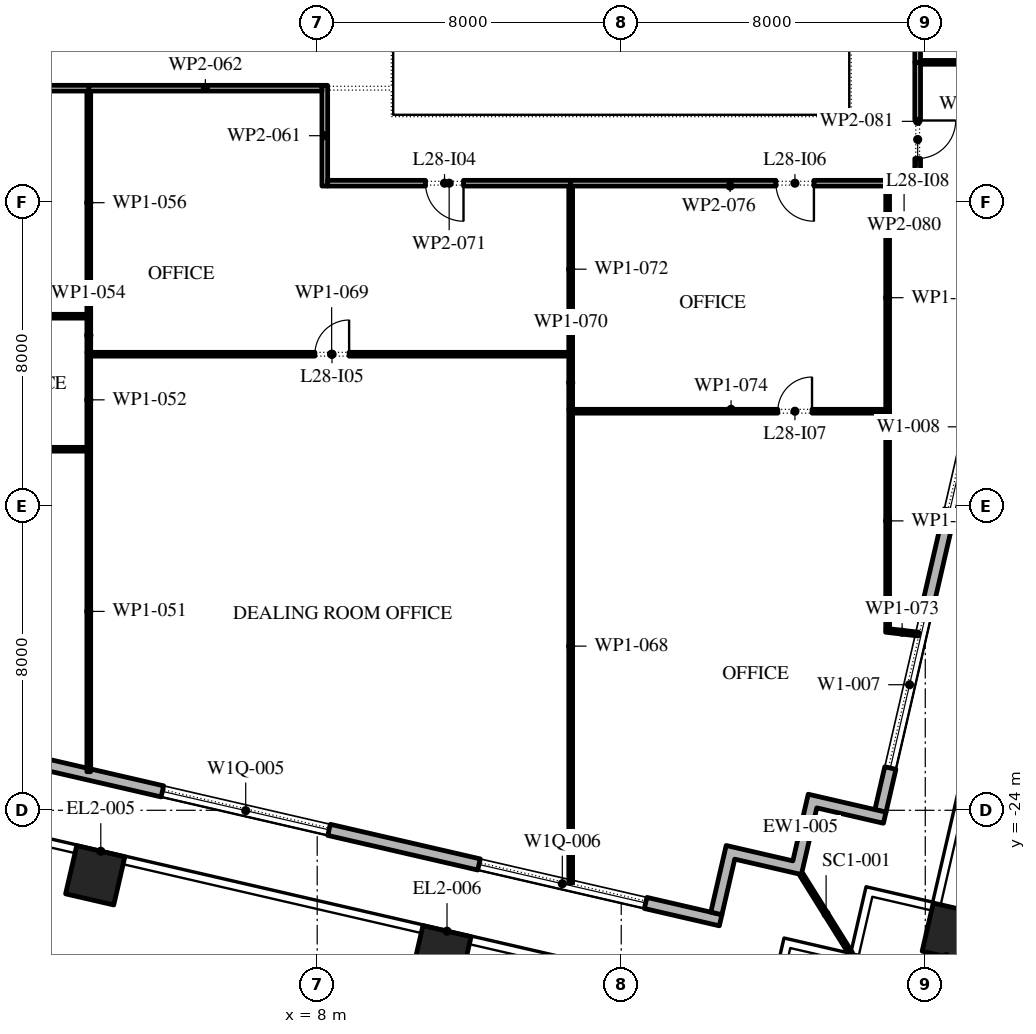
"""IFC4 building model, lengths in metres.
Left out: names, types, materials, properties, quantities, classifications, styles, units other than length and angle.
Written with IfcOpenShell. Run it as: python <this file> out.ifc"""

import sys

from ifc_helpers import new_model, si_unit, direction, frame, frame_2d, origin, origin_2d, place, context, subcontext, project, spatial, polyline, rectangle, outline, extrude, element, fill, save


model = new_model("IFC4")
c1 = context("Model", 3, precision=1e-05, world=origin(), true_north=direction((0.0, 1.0)))
c2 = subcontext(c1, "Body", "Model", "MODEL_VIEW")
j1 = project(units=[si_unit("LENGTHUNIT", "METRE"), si_unit("PLANEANGLEUNIT", "RADIAN")], contexts=[c1])
p1 = place(None, origin())
s1 = spatial("IfcSite", under=j1, at=p1, CompositionType="ELEMENT")
p2 = place(p1, origin())
s2 = spatial("IfcBuilding", under=s1, at=p2, CompositionType="ELEMENT")
p3 = place(p2, frame((0.0, 0.0, 130.8)))
s3 = spatial("IfcBuildingStorey", under=s2, at=p3, CompositionType="ELEMENT", Elevation=130.8)
for number, where, z_axis, x_axis in (
    (1, (2.159, -25.711, 0.0), (0.0, 0.0, 1.0), (0.974, -0.225, 0.0)),
    (2, (11.27, -27.815, 0.0), (0.0, 0.0, 1.0), (0.974, -0.225, 0.0)),
    (3, (24.698, -27.22, 0.0), (0.0, 0.0, 1.0), (0.974, -0.225, 0.0)),
    (4, (22.539, -28.569, 0.0), (0.0, 0.0, 1.0), (0.974, -0.225, 0.0)),
):
    element("IfcColumn", number, at=place(p3, frame(where, z_axis=z_axis, x_axis=x_axis)), inside=s3, PredefinedType="COLUMN", context=c2, shape_type="SweptSolid", body=[
        extrude(rectangle(XDim=1.3, YDim=1.3, at=origin_2d()), origin(), (0.0, 0.0, 1.0), 4.2),
    ])
p4 = place(p3, frame((-31.078, -15.421, 0.0), z_axis=(0.0, 0.0, 1.0), x_axis=(0.974370456532, -0.224949357493, 0.0)))
e5 = element("IfcWall", 5, at=p4, inside=s3, PredefinedType="STANDARD", context=c2, shape_type="SweptSolid", body=[
    extrude(rectangle(XDim=51.0, YDim=0.3, at=frame_2d((25.5, 0.0))), origin(), (0.0, 0.0, 1.0), 4.0),
])
p5 = place(p4, frame((1.875, 0.0, 0.45)))
e6 = element("IfcOpeningElement", 6, at=p5, cuts=e5, PredefinedType="OPENING", context=c2, shape_type="SweptSolid", body=[
    extrude(rectangle(XDim=4.5, YDim=2.65, at=frame_2d((2.25, 1.325))), frame((0.0, 0.16, 0.0), z_axis=(0.0, -1.0, 0.0), x_axis=(1.0, 0.0, 0.0)), (0.0, 0.0, 1.0), 0.32),
])
p6 = place(p4, frame((10.275, 0.0, 0.45)))
e7 = element("IfcOpeningElement", 7, at=p6, cuts=e5, PredefinedType="OPENING", context=c2, shape_type="SweptSolid", body=[
    extrude(rectangle(XDim=4.5, YDim=2.525, at=frame_2d((2.25, 1.262))), frame((0.0, 0.16, 0.0), z_axis=(0.0, -1.0, 0.0), x_axis=(1.0, 0.0, 0.0)), (0.0, 0.0, 1.0), 0.32),
])
p7 = place(p4, frame((18.825, 0.0, 0.45)))
e8 = element("IfcOpeningElement", 8, at=p7, cuts=e5, PredefinedType="OPENING", context=c2, shape_type="SweptSolid", body=[
    extrude(rectangle(XDim=4.5, YDim=2.5, at=frame_2d((2.25, 1.25))), frame((0.0, 0.16, 0.0), z_axis=(0.0, -1.0, 0.0), x_axis=(1.0, 0.0, 0.0)), (0.0, 0.0, 1.0), 0.32),
])
p8 = place(p4, frame((28.425, 0.0, 0.0)))
e9 = element("IfcOpeningElement", 9, at=p8, cuts=e5, PredefinedType="OPENING", context=c2, shape_type="SweptSolid", body=[
    extrude(rectangle(XDim=2.4, YDim=2.9, at=frame_2d((1.2, 1.45))), frame((0.0, 0.16, 0.0), z_axis=(0.0, -1.0, 0.0), x_axis=(1.0, 0.0, 0.0)), (0.0, 0.0, 1.0), 0.32),
])
p9 = place(p4, frame((35.925, 0.0, 0.45)))
e10 = element("IfcOpeningElement", 10, at=p9, cuts=e5, PredefinedType="OPENING", context=c2, shape_type="SweptSolid", body=[
    extrude(rectangle(XDim=4.5, YDim=2.45, at=frame_2d((2.25, 1.225))), frame((0.0, 0.16, 0.0), z_axis=(0.0, -1.0, 0.0), x_axis=(1.0, 0.0, 0.0)), (0.0, 0.0, 1.0), 0.32),
])
p10 = place(p4, frame((44.475, 0.0, 0.45)))
e11 = element("IfcOpeningElement", 11, at=p10, cuts=e5, PredefinedType="OPENING", context=c2, shape_type="SweptSolid", body=[
    extrude(rectangle(XDim=4.5, YDim=2.45, at=frame_2d((2.25, 1.225))), frame((0.0, 0.16, 0.0), z_axis=(0.0, -1.0, 0.0), x_axis=(1.0, 0.0, 0.0)), (0.0, 0.0, 1.0), 0.32),
])
p11 = place(p3, frame((22.82, -24.016, 0.0), z_axis=(0.0, 0.0, 1.0), x_axis=(0.224953880882, 0.974369412223, 0.0)))
e12 = element("IfcWall", 12, at=p11, inside=s3, PredefinedType="STANDARD", context=c2, shape_type="SweptSolid", body=[
    extrude(rectangle(XDim=49.5, YDim=0.3, at=frame_2d((24.75, 0.0))), origin(), (0.0, 0.0, 1.0), 4.0),
])
p12 = place(p11, frame((1.157, 0.0, 0.45)))
e13 = element("IfcOpeningElement", 13, at=p12, cuts=e12, PredefinedType="OPENING", context=c2, shape_type="SweptSolid", body=[
    extrude(rectangle(XDim=4.5, YDim=3.05, at=frame_2d((2.25, 1.525))), frame((0.0, 0.16, 0.0), z_axis=(0.0, -1.0, 0.0), x_axis=(1.0, 0.0, 0.0)), (0.0, 0.0, 1.0), 0.32),
])
p13 = place(p11, frame((8.121, 0.0, 0.45)))
e14 = element("IfcOpeningElement", 14, at=p13, cuts=e12, PredefinedType="OPENING", context=c2, shape_type="SweptSolid", body=[
    extrude(rectangle(XDim=4.5, YDim=3.05, at=frame_2d((2.25, 1.525))), frame((0.0, 0.16, 0.0), z_axis=(0.0, -1.0, 0.0), x_axis=(1.0, 0.0, 0.0)), (0.0, 0.0, 1.0), 0.32),
])
p14 = place(p11, frame((15.236, 0.0, 0.45)))
e15 = element("IfcOpeningElement", 15, at=p14, cuts=e12, PredefinedType="OPENING", context=c2, shape_type="SweptSolid", body=[
    extrude(rectangle(XDim=4.5, YDim=3.05, at=frame_2d((2.25, 1.525))), frame((0.0, 0.16, 0.0), z_axis=(0.0, -1.0, 0.0), x_axis=(1.0, 0.0, 0.0)), (0.0, 0.0, 1.0), 0.32),
])
p15 = place(p11, frame((23.4, 0.0, 0.0)))
e16 = element("IfcOpeningElement", 16, at=p15, cuts=e12, PredefinedType="OPENING", context=c2, shape_type="SweptSolid", body=[
    extrude(rectangle(XDim=2.4, YDim=3.5, at=frame_2d((1.2, 1.75))), frame((0.0, 0.16, 0.0), z_axis=(0.0, -1.0, 0.0), x_axis=(1.0, 0.0, 0.0)), (0.0, 0.0, 1.0), 0.32),
])
p16 = place(p11, frame((29.464, 0.0, 0.45)))
e17 = element("IfcOpeningElement", 17, at=p16, cuts=e12, PredefinedType="OPENING", context=c2, shape_type="SweptSolid", body=[
    extrude(rectangle(XDim=4.5, YDim=2.875, at=frame_2d((2.25, 1.438))), frame((0.0, 0.16, 0.0), z_axis=(0.0, -1.0, 0.0), x_axis=(1.0, 0.0, 0.0)), (0.0, 0.0, 1.0), 0.32),
])
p17 = place(p11, frame((36.579, 0.0, 0.45)))
e18 = element("IfcOpeningElement", 18, at=p17, cuts=e12, PredefinedType="OPENING", context=c2, shape_type="SweptSolid", body=[
    extrude(rectangle(XDim=4.5, YDim=2.825, at=frame_2d((2.25, 1.413))), frame((0.0, 0.16, 0.0), z_axis=(0.0, -1.0, 0.0), x_axis=(1.0, 0.0, 0.0)), (0.0, 0.0, 1.0), 0.32),
])
p18 = place(p11, frame((43.693, 0.0, 0.45)))
e19 = element("IfcOpeningElement", 19, at=p18, cuts=e12, PredefinedType="OPENING", context=c2, shape_type="SweptSolid", body=[
    extrude(rectangle(XDim=4.5, YDim=2.75, at=frame_2d((2.25, 1.375))), frame((0.0, 0.16, 0.0), z_axis=(0.0, -1.0, 0.0), x_axis=(1.0, 0.0, 0.0)), (0.0, 0.0, 1.0), 0.32),
])
p19 = place(p3, origin())
e20 = element("IfcWall", 20, at=p19, inside=s3, PredefinedType="STANDARD", context=c2, shape_type="SweptSolid", body=[
    extrude(outline(polyline([(20.515, -25.331), (20.92, -23.577), (22.967, -24.049), (22.899, -24.342), (21.145, -23.937), (20.74, -25.691), (18.986, -25.286), (18.649, -26.747), (18.357, -26.68), (18.762, -24.926), (20.515, -25.331)])), origin(), (0.0, 0.0, 1.0), 4.0),
])
p20 = place(p3, frame((20.74, -25.691, -0.05), z_axis=(0.0, 0.0, 1.0), x_axis=(0.529972121605, -0.848015064914, 0.0)))
e21 = element("IfcWall", 21, at=p20, inside=s3, PredefinedType="STANDARD", context=c2, shape_type="SweptSolid", body=[
    extrude(rectangle(XDim=2.455, YDim=0.1, at=frame_2d((1.228, 0.0))), origin(), (0.0, 0.0, 1.0), 4.05),
])
p21 = place(p3, frame((2.04, -14.5, 0.0), z_axis=(0.0, 0.0, 1.0), x_axis=(-1.0, 0.0, 0.0)))
e22 = element("IfcWall", 22, at=p21, inside=s3, PredefinedType="PARTITIONING", context=c2, shape_type="SweptSolid", body=[
    extrude(rectangle(XDim=8.33, YDim=0.1, at=frame_2d((4.165, 0.0))), origin(), (0.0, 0.0, 1.0), 4.0),
])
p22 = place(p3, frame((1.99, -14.55, 0.0), z_axis=(0.0, 0.0, 1.0), x_axis=(0.0, -1.0, 0.0)))
e23 = element("IfcWall", 23, at=p22, inside=s3, PredefinedType="PARTITIONING", context=c2, shape_type="SweptSolid", body=[
    extrude(rectangle(XDim=8.434, YDim=0.1, at=frame_2d((4.217, 0.0))), origin(), (0.0, 0.0, 1.0), 4.0),
])
p23 = place(p3, frame((1.99, -11.95, 0.0), z_axis=(0.0, 0.0, 1.0), x_axis=(0.0, -1.0, 0.0)))
e24 = element("IfcWall", 24, at=p23, inside=s3, PredefinedType="PARTITIONING", context=c2, shape_type="SweptSolid", body=[
    extrude(rectangle(XDim=2.5, YDim=0.1, at=frame_2d((1.25, 0.0))), origin(), (0.0, 0.0, 1.0), 4.0),
])
p24 = place(p3, frame((2.04, -11.0, 0.0), z_axis=(0.0, 0.0, 1.0), x_axis=(-1.0, 0.0, 0.0)))
e25 = element("IfcWall", 25, at=p24, inside=s3, PredefinedType="PARTITIONING", context=c2, shape_type="SweptSolid", body=[
    extrude(rectangle(XDim=8.33, YDim=0.1, at=frame_2d((4.165, 0.0))), origin(), (0.0, 0.0, 1.0), 4.0),
])
p25 = place(p24, frame((5.53, 0.0, 0.0)))
e26 = element("IfcOpeningElement", 26, at=p25, cuts=e25, PredefinedType="OPENING", context=c2, shape_type="SweptSolid", body=[
    extrude(rectangle(XDim=0.9, YDim=2.1, at=frame_2d((0.45, 1.05))), frame((0.0, 0.06, 0.0), z_axis=(0.0, -1.0, 0.0), x_axis=(1.0, 0.0, 0.0)), (0.0, 0.0, 1.0), 0.12),
])
p26 = place(p3, frame((1.99, -11.05, 0.0), z_axis=(0.0, 0.0, 1.0), x_axis=(0.0, -1.0, 0.0)))
e27 = element("IfcWall", 27, at=p26, inside=s3, PredefinedType="PARTITIONING", context=c2, shape_type="SweptSolid", body=[
    extrude(rectangle(XDim=0.9, YDim=0.1, at=frame_2d((0.45, 0.0))), origin(), (0.0, 0.0, 1.0), 4.0),
])
p27 = place(p3, frame((2.04, -5.0, 0.0), z_axis=(0.0, 0.0, 1.0), x_axis=(-1.0, 0.0, 0.0)))
e28 = element("IfcWall", 28, at=p27, inside=s3, PredefinedType="PARTITIONING", context=c2, shape_type="SweptSolid", body=[
    extrude(rectangle(XDim=8.305, YDim=0.15, at=frame_2d((4.152, 0.0))), origin(), (0.0, 0.0, 1.0), 4.0),
])
p28 = place(p27, frame((1.98, 0.0, 0.0)))
e29 = element("IfcOpeningElement", 29, at=p28, cuts=e28, PredefinedType="OPENING", context=c2, shape_type="SweptSolid", body=[
    extrude(rectangle(XDim=1.0, YDim=2.1, at=frame_2d((0.5, 1.05))), frame((0.0, 0.085, 0.0), z_axis=(0.0, -1.0, 0.0), x_axis=(1.0, 0.0, 0.0)), (0.0, 0.0, 1.0), 0.17),
])
p29 = place(p3, frame((1.99, -5.075, 0.0), z_axis=(0.0, 0.0, 1.0), x_axis=(0.0, -1.0, 0.0)))
e30 = element("IfcWall", 30, at=p29, inside=s3, PredefinedType="PARTITIONING", context=c2, shape_type="SweptSolid", body=[
    extrude(rectangle(XDim=5.875, YDim=0.1, at=frame_2d((2.938, 0.0))), origin(), (0.0, 0.0, 1.0), 4.0),
])
p30 = place(p3, frame((8.2, -7.575, 0.0), z_axis=(0.0, 0.0, 1.0), x_axis=(0.0, 1.0, 0.0)))
e31 = element("IfcWall", 31, at=p30, inside=s3, PredefinedType="PARTITIONING", context=c2, shape_type="SweptSolid", body=[
    extrude(rectangle(XDim=2.65, YDim=0.15, at=frame_2d((1.325, 0.0))), origin(), (0.0, 0.0, 1.0), 4.0),
])
p31 = place(p3, frame((8.125, -5.0, 0.0), z_axis=(0.0, 0.0, 1.0), x_axis=(-1.0, 0.0, 0.0)))
e32 = element("IfcWall", 32, at=p31, inside=s3, PredefinedType="PARTITIONING", context=c2, shape_type="SweptSolid", body=[
    extrude(rectangle(XDim=6.135, YDim=0.15, at=frame_2d((3.067, 0.0))), origin(), (0.0, 0.0, 1.0), 4.0),
])
p32 = place(p3, frame((14.67, -13.45, 0.0), z_axis=(0.0, 0.0, 1.0), x_axis=(0.0, -1.0, 0.0)))
e33 = element("IfcWall", 33, at=p32, inside=s3, PredefinedType="PARTITIONING", context=c2, shape_type="SweptSolid", body=[
    extrude(rectangle(XDim=12.461, YDim=0.1, at=frame_2d((6.23, 0.0))), origin(), (0.0, 0.0, 1.0), 4.0),
])
p33 = place(p3, frame((14.72, -12.0, 0.0), z_axis=(0.0, 0.0, 1.0), x_axis=(-1.0, 0.0, 0.0)))
e34 = element("IfcWall", 34, at=p33, inside=s3, PredefinedType="PARTITIONING", context=c2, shape_type="SweptSolid", body=[
    extrude(rectangle(XDim=12.68, YDim=0.1, at=frame_2d((6.34, 0.0))), origin(), (0.0, 0.0, 1.0), 4.0),
])
p34 = place(p33, frame((5.88, 0.0, 0.0)))
e35 = element("IfcOpeningElement", 35, at=p34, cuts=e34, PredefinedType="OPENING", context=c2, shape_type="SweptSolid", body=[
    extrude(rectangle(XDim=0.9, YDim=2.1, at=frame_2d((0.45, 1.05))), frame((0.0, 0.06, 0.0), z_axis=(0.0, -1.0, 0.0), x_axis=(1.0, 0.0, 0.0)), (0.0, 0.0, 1.0), 0.12),
])
p35 = place(p3, frame((14.67, -12.05, 0.0), z_axis=(0.0, 0.0, 1.0), x_axis=(0.0, -1.0, 0.0)))
e36 = element("IfcWall", 36, at=p35, inside=s3, PredefinedType="PARTITIONING", context=c2, shape_type="SweptSolid", body=[
    extrude(rectangle(XDim=1.4, YDim=0.1, at=frame_2d((0.7, 0.0))), origin(), (0.0, 0.0, 1.0), 4.0),
])
p36 = place(p3, frame((14.67, -7.5, 0.0), z_axis=(0.0, 0.0, 1.0), x_axis=(-1.0, 0.0, 0.0)))
e37 = element("IfcWall", 37, at=p36, inside=s3, PredefinedType="PARTITIONING", context=c2, shape_type="SweptSolid", body=[
    extrude(rectangle(XDim=6.395, YDim=0.15, at=frame_2d((3.198, 0.0))), origin(), (0.0, 0.0, 1.0), 4.0),
])
p37 = place(p36, frame((2.82, 0.0, 0.0)))
e38 = element("IfcOpeningElement", 38, at=p37, cuts=e37, PredefinedType="OPENING", context=c2, shape_type="SweptSolid", body=[
    extrude(rectangle(XDim=1.0, YDim=2.1, at=frame_2d((0.5, 1.05))), frame((0.0, 0.085, 0.0), z_axis=(0.0, -1.0, 0.0), x_axis=(1.0, 0.0, 0.0)), (0.0, 0.0, 1.0), 0.17),
])
p38 = place(p3, frame((14.67, -7.575, 0.0), z_axis=(0.0, 0.0, 1.0), x_axis=(0.0, -1.0, 0.0)))
e39 = element("IfcWall", 39, at=p38, inside=s3, PredefinedType="PARTITIONING", context=c2, shape_type="SweptSolid", body=[
    extrude(rectangle(XDim=4.375, YDim=0.1, at=frame_2d((2.188, 0.0))), origin(), (0.0, 0.0, 1.0), 4.0),
])
p39 = place(p3, frame((22.96, -19.264, 0.0), z_axis=(0.0, 0.0, 1.0), x_axis=(0.993326131588, -0.115339482852, 0.0)))
e40 = element("IfcWall", 40, at=p39, inside=s3, PredefinedType="PARTITIONING", context=c2, shape_type="SweptSolid", body=[
    extrude(rectangle(XDim=0.868, YDim=0.1, at=frame_2d((0.434, 0.0))), origin(), (0.0, 0.0, 1.0), 4.0),
])
p40 = place(p3, frame((23.06, -13.5, 0.0), z_axis=(0.0, 0.0, 1.0), x_axis=(-1.0, 0.0, 0.0)))
e41 = element("IfcWall", 41, at=p40, inside=s3, PredefinedType="PARTITIONING", context=c2, shape_type="SweptSolid", body=[
    extrude(rectangle(XDim=8.34, YDim=0.1, at=frame_2d((4.17, 0.0))), origin(), (0.0, 0.0, 1.0), 4.0),
])
p41 = place(p40, frame((2.04, 0.0, 0.0)))
e42 = element("IfcOpeningElement", 42, at=p41, cuts=e41, PredefinedType="OPENING", context=c2, shape_type="SweptSolid", body=[
    extrude(rectangle(XDim=0.9, YDim=2.1, at=frame_2d((0.45, 1.05))), frame((0.0, 0.06, 0.0), z_axis=(0.0, -1.0, 0.0), x_axis=(1.0, 0.0, 0.0)), (0.0, 0.0, 1.0), 0.12),
])
p42 = place(p3, frame((23.01, -13.55, 0.0), z_axis=(0.0, 0.0, 1.0), x_axis=(0.0, -1.0, 0.0)))
e43 = element("IfcWall", 43, at=p42, inside=s3, PredefinedType="PARTITIONING", context=c2, shape_type="SweptSolid", body=[
    extrude(rectangle(XDim=5.67, YDim=0.1, at=frame_2d((2.835, 0.0))), origin(), (0.0, 0.0, 1.0), 4.0),
])
p43 = place(p3, frame((23.06, -7.5, 0.0), z_axis=(0.0, 0.0, 1.0), x_axis=(-1.0, 0.0, 0.0)))
e44 = element("IfcWall", 44, at=p43, inside=s3, PredefinedType="PARTITIONING", context=c2, shape_type="SweptSolid", body=[
    extrude(rectangle(XDim=8.39, YDim=0.15, at=frame_2d((4.195, 0.0))), origin(), (0.0, 0.0, 1.0), 4.0),
])
p44 = place(p43, frame((1.99, 0.0, 0.0)))
e45 = element("IfcOpeningElement", 45, at=p44, cuts=e44, PredefinedType="OPENING", context=c2, shape_type="SweptSolid", body=[
    extrude(rectangle(XDim=1.0, YDim=2.1, at=frame_2d((0.5, 1.05))), frame((0.0, 0.085, 0.0), z_axis=(0.0, -1.0, 0.0), x_axis=(1.0, 0.0, 0.0)), (0.0, 0.0, 1.0), 0.17),
])
p45 = place(p3, frame((23.01, -7.575, 0.0), z_axis=(0.0, 0.0, 1.0), x_axis=(0.0, -1.0, 0.0)))
e46 = element("IfcWall", 46, at=p45, inside=s3, PredefinedType="PARTITIONING", context=c2, shape_type="SweptSolid", body=[
    extrude(rectangle(XDim=5.875, YDim=0.1, at=frame_2d((2.938, 0.0))), origin(), (0.0, 0.0, 1.0), 4.0),
])
p46 = place(p3, frame((23.875, -7.5, 0.0), z_axis=(0.0, 0.0, 1.0), x_axis=(-1.0, 0.0, 0.0)))
e47 = element("IfcWall", 47, at=p46, inside=s3, PredefinedType="PARTITIONING", context=c2, shape_type="SweptSolid", body=[
    extrude(rectangle(XDim=0.865, YDim=0.15, at=frame_2d((0.433, 0.0))), origin(), (0.0, 0.0, 1.0), 4.0),
])
p47 = place(p3, frame((23.8, -4.32, 0.0), z_axis=(0.0, 0.0, 1.0), x_axis=(0.0, -1.0, 0.0)))
e48 = element("IfcWall", 48, at=p47, inside=s3, PredefinedType="PARTITIONING", context=c2, shape_type="SweptSolid", body=[
    extrude(rectangle(XDim=3.105, YDim=0.15, at=frame_2d((1.552, 0.0))), origin(), (0.0, 0.0, 1.0), 4.0),
])
p48 = place(p47, frame((1.53, 0.0, 0.0)))
e49 = element("IfcOpeningElement", 49, at=p48, cuts=e48, PredefinedType="OPENING", context=c2, shape_type="SweptSolid", body=[
    extrude(rectangle(XDim=1.0, YDim=2.1, at=frame_2d((0.5, 1.05))), frame((0.0, 0.085, 0.0), z_axis=(0.0, -1.0, 0.0), x_axis=(1.0, 0.0, 0.0)), (0.0, 0.0, 1.0), 0.17),
])
p49 = place(p3, frame((23.875, -4.32, 0.0), z_axis=(0.0, 0.0, 1.0), x_axis=(1.0, 0.0, 0.0)))
e50 = element("IfcWall", 50, at=p49, inside=s3, PredefinedType="PARTITIONING", context=c2, shape_type="SweptSolid", body=[
    extrude(rectangle(XDim=3.421, YDim=0.1, at=frame_2d((1.71, 0.0))), origin(), (0.0, 0.0, 1.0), 4.0),
])
p50 = place(p3, frame((23.8, 10.44, 0.0), z_axis=(0.0, 0.0, 1.0), x_axis=(0.0, -1.0, 0.0)))
e51 = element("IfcWall", 51, at=p50, inside=s3, PredefinedType="PARTITIONING", context=c2, shape_type="SweptSolid", body=[
    extrude(rectangle(XDim=14.76, YDim=0.15, at=frame_2d((7.38, 0.0))), origin(), (0.0, 0.0, 1.0), 4.0),
])
p51 = place(p50, frame((9.86, 0.0, 0.0)))
e52 = element("IfcOpeningElement", 52, at=p51, cuts=e51, PredefinedType="OPENING", context=c2, shape_type="SweptSolid", body=[
    extrude(rectangle(XDim=1.0, YDim=2.1, at=frame_2d((0.5, 1.05))), frame((0.0, 0.085, 0.0), z_axis=(0.0, -1.0, 0.0), x_axis=(1.0, 0.0, 0.0)), (0.0, 0.0, 1.0), 0.17),
])
p52 = place(p9, origin())
e53 = element("IfcWindow", 53, at=p52, inside=s3, PartitioningType="DOUBLE_PANEL_VERTICAL", PredefinedType="WINDOW", context=c2, shape_type="SweptSolid", body=[
    extrude(rectangle(XDim=4.5, YDim=2.45, at=frame_2d((2.25, 1.225))), frame((0.0, 0.03, 0.0), z_axis=(0.0, -1.0, 0.0), x_axis=(1.0, 0.0, 0.0)), (0.0, 0.0, 1.0), 0.06),
])
fill(e10, e53)
p53 = place(p10, origin())
e54 = element("IfcWindow", 54, at=p53, inside=s3, PartitioningType="DOUBLE_PANEL_VERTICAL", PredefinedType="WINDOW", context=c2, shape_type="SweptSolid", body=[
    extrude(rectangle(XDim=4.5, YDim=2.45, at=frame_2d((2.25, 1.225))), frame((0.0, 0.03, 0.0), z_axis=(0.0, -1.0, 0.0), x_axis=(1.0, 0.0, 0.0)), (0.0, 0.0, 1.0), 0.06),
])
fill(e11, e54)
p54 = place(p12, origin())
e55 = element("IfcWindow", 55, at=p54, inside=s3, PartitioningType="DOUBLE_PANEL_VERTICAL", PredefinedType="WINDOW", context=c2, shape_type="SweptSolid", body=[
    extrude(rectangle(XDim=4.5, YDim=3.05, at=frame_2d((2.25, 1.525))), frame((0.0, 0.03, 0.0), z_axis=(0.0, -1.0, 0.0), x_axis=(1.0, 0.0, 0.0)), (0.0, 0.0, 1.0), 0.06),
])
fill(e13, e55)
p55 = place(p13, origin())
e56 = element("IfcWindow", 56, at=p55, inside=s3, PartitioningType="DOUBLE_PANEL_VERTICAL", PredefinedType="WINDOW", context=c2, shape_type="SweptSolid", body=[
    extrude(rectangle(XDim=4.5, YDim=3.05, at=frame_2d((2.25, 1.525))), frame((0.0, 0.03, 0.0), z_axis=(0.0, -1.0, 0.0), x_axis=(1.0, 0.0, 0.0)), (0.0, 0.0, 1.0), 0.06),
])
fill(e14, e56)
p56 = place(p37, origin())
e57 = element("IfcDoor", 57, at=p56, inside=s3, OperationType="SINGLE_SWING_RIGHT", PredefinedType="DOOR", context=c2, shape_type="SweptSolid", body=[
    extrude(rectangle(XDim=1.0, YDim=2.1, at=frame_2d((0.5, 1.05))), frame((0.0, 0.025, 0.0), z_axis=(0.0, -1.0, 0.0), x_axis=(1.0, 0.0, 0.0)), (0.0, 0.0, 1.0), 0.05),
])
fill(e38, e57)
p57 = place(p34, frame((0.9, 0.0, 0.0), z_axis=(0.0, 0.0, 1.0), x_axis=(-1.0, 0.0, 0.0)))
e58 = element("IfcDoor", 58, at=p57, inside=s3, OperationType="SINGLE_SWING_LEFT", PredefinedType="DOOR", context=c2, shape_type="SweptSolid", body=[
    extrude(rectangle(XDim=0.9, YDim=2.1, at=frame_2d((0.45, 1.05))), frame((0.0, 0.025, 0.0), z_axis=(0.0, -1.0, 0.0), x_axis=(1.0, 0.0, 0.0)), (0.0, 0.0, 1.0), 0.05),
])
fill(e35, e58)
p58 = place(p44, origin())
e59 = element("IfcDoor", 59, at=p58, inside=s3, OperationType="SINGLE_SWING_RIGHT", PredefinedType="DOOR", context=c2, shape_type="SweptSolid", body=[
    extrude(rectangle(XDim=1.0, YDim=2.1, at=frame_2d((0.5, 1.05))), frame((0.0, 0.025, 0.0), z_axis=(0.0, -1.0, 0.0), x_axis=(1.0, 0.0, 0.0)), (0.0, 0.0, 1.0), 0.05),
])
fill(e45, e59)
p59 = place(p41, frame((0.9, 0.0, 0.0), z_axis=(0.0, 0.0, 1.0), x_axis=(-1.0, 0.0, 0.0)))
e60 = element("IfcDoor", 60, at=p59, inside=s3, OperationType="SINGLE_SWING_LEFT", PredefinedType="DOOR", context=c2, shape_type="SweptSolid", body=[
    extrude(rectangle(XDim=0.9, YDim=2.1, at=frame_2d((0.45, 1.05))), frame((0.0, 0.025, 0.0), z_axis=(0.0, -1.0, 0.0), x_axis=(1.0, 0.0, 0.0)), (0.0, 0.0, 1.0), 0.05),
])
fill(e42, e60)
p60 = place(p48, origin())
e61 = element("IfcDoor", 61, at=p60, inside=s3, OperationType="SINGLE_SWING_RIGHT", PredefinedType="DOOR", context=c2, shape_type="SweptSolid", body=[
    extrude(rectangle(XDim=1.0, YDim=2.1, at=frame_2d((0.5, 1.05))), frame((0.0, 0.025, 0.0), z_axis=(0.0, -1.0, 0.0), x_axis=(1.0, 0.0, 0.0)), (0.0, 0.0, 1.0), 0.05),
])
fill(e49, e61)
save(model, sys.argv[1])
